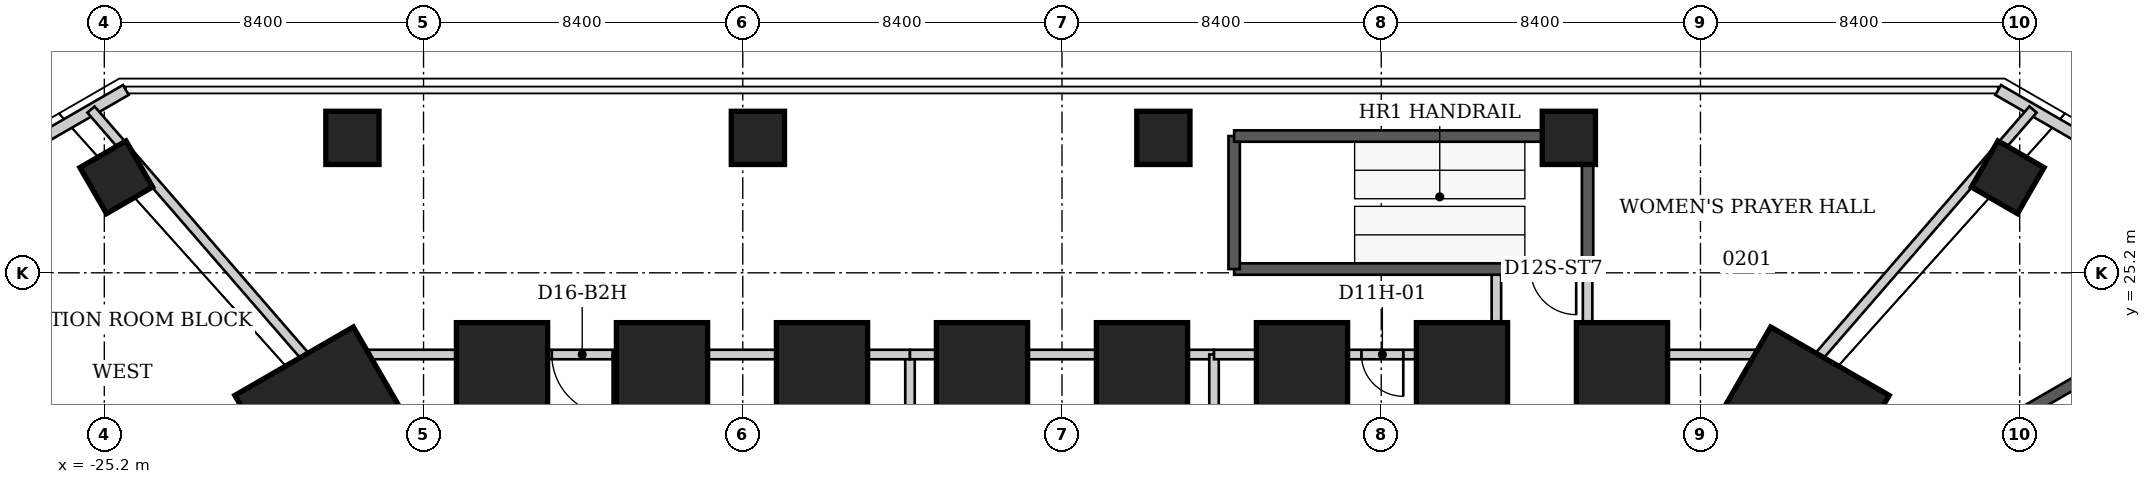
"""IFC4 building model, lengths in metres.
Left out: names, types, materials, properties, quantities, classifications, styles, units other than length and angle.
Written with IfcOpenShell. Run it as: python <this file> out.ifc"""

import sys

from ifc_helpers import new_model, si_unit, direction, frame, frame_2d, origin, origin_2d, place, context, subcontext, project, spatial, rectangle, extrude, element, fill, save


model = new_model("IFC4")
c1 = context("Model", 3, precision=1e-05, world=origin(), true_north=direction((0.0, 1.0)))
c2 = subcontext(c1, "Body", "Model", "MODEL_VIEW")
j1 = project(units=[si_unit("LENGTHUNIT", "METRE"), si_unit("PLANEANGLEUNIT", "RADIAN")], contexts=[c1])
p1 = place(None, origin())
s1 = spatial("IfcSite", under=j1, at=p1, CompositionType="ELEMENT")
p2 = place(p1, origin())
s2 = spatial("IfcBuilding", under=s1, at=p2, CompositionType="ELEMENT")
p3 = place(p2, frame((0.0, 0.0, 12.0)))
s3 = spatial("IfcBuildingStorey", under=s2, at=p3, CompositionType="ELEMENT", Elevation=12.0)
for number, where, z_axis, x_axis in (
    (1, (-14.735, 22.689, 0.0), (0.0, 0.0, 1.0), (0.0, 1.0, 0.0)),
    (2, (-10.525, 22.689, 0.0), (0.0, 0.0, 1.0), (0.0, 1.0, 0.0)),
    (3, (-6.315, 22.689, 0.0), (0.0, 0.0, 1.0), (0.0, 1.0, 0.0)),
    (4, (-2.105, 22.689, 0.0), (0.0, 0.0, 1.0), (0.0, 1.0, 0.0)),
    (5, (2.105, 22.689, 0.0), (0.0, 0.0, 1.0), (0.0, 1.0, 0.0)),
    (6, (6.315, 22.689, 0.0), (0.0, 0.0, 1.0), (0.0, 1.0, 0.0)),
    (7, (10.525, 22.689, 0.0), (0.0, 0.0, 1.0), (0.0, 1.0, 0.0)),
    (8, (14.735, 22.689, 0.0), (0.0, 0.0, 1.0), (0.0, 1.0, 0.0)),
):
    element("IfcColumn", number, at=place(p3, frame(where, z_axis=z_axis, x_axis=x_axis)), inside=s3, PredefinedType="COLUMN", context=c2, shape_type="SweptSolid", body=[
        extrude(rectangle(XDim=2.4, YDim=2.4, at=origin_2d()), origin(), (0.0, 0.0, 1.0), 6.0),
    ])
for number, where, z_axis, x_axis in (
    (9, (19.606, 21.835, 0.0), (0.0, 0.0, 1.0), (0.5, 0.866, 0.0)),
    (10, (-19.606, 21.835, 0.0), (0.0, 0.0, 1.0), (-0.5, 0.866, 0.0)),
):
    element("IfcColumn", number, at=place(p3, frame(where, z_axis=z_axis, x_axis=x_axis)), inside=s3, PredefinedType="COLUMN", context=c2, shape_type="SweptSolid", body=[
        extrude(rectangle(XDim=2.4, YDim=3.6, at=origin_2d()), origin(), (0.0, 0.0, 1.0), 6.0),
    ])
for number, where, z_axis, x_axis in (
    (11, (-18.672, 28.751, 0.0), (0.0, 0.0, 1.0), (0.0, 1.0, 0.0)),
    (12, (-8.002, 28.751, 0.0), (0.0, 0.0, 1.0), (0.0, 1.0, 0.0)),
    (13, (2.667, 28.751, 0.0), (0.0, 0.0, 1.0), (0.0, 1.0, 0.0)),
    (14, (13.337, 28.751, 0.0), (0.0, 0.0, 1.0), (0.0, 1.0, 0.0)),
    (15, (24.885, 27.714, 0.0), (0.0, 0.0, 1.0), (0.5, 0.866, 0.0)),
    (16, (-24.885, 27.714, 0.0), (0.0, 0.0, 1.0), (-0.5, 0.866, 0.0)),
):
    element("IfcColumn", number, at=place(p3, frame(where, z_axis=z_axis, x_axis=x_axis)), inside=s3, PredefinedType="COLUMN", context=c2, shape_type="SweptSolid", body=[
        extrude(rectangle(XDim=1.4, YDim=1.4, at=origin_2d()), origin(), (0.0, 0.0, 1.0), 6.0),
    ])
for number, where, z_axis, x_axis in (
    (17, (24.633, 30.011, 0.0), (0.0, 0.0, 1.0), (0.866, -0.5, 0.0)),
    (18, (-26.799, 28.761, 0.0), (0.0, 0.0, 1.0), (0.866, 0.5, 0.0)),
):
    element("IfcWall", number, at=place(p3, frame(where, z_axis=z_axis, x_axis=x_axis)), inside=s3, PredefinedType="SOLIDWALL", context=c2, shape_type="SweptSolid", body=[
        extrude(rectangle(XDim=2.5, YDim=0.3, at=frame_2d((1.25, 0.0))), origin(), (0.0, 0.0, 1.0), 5.6),
    ])
p4 = place(p3, frame((-20.88, 22.05, 0.0), z_axis=(0.0, 0.0, 1.0), x_axis=(-0.50097690648, -0.86546065143, 0.0)))
e19 = element("IfcWall", 19, at=p4, inside=s3, PredefinedType="PARTITIONING", context=c2, shape_type="SweptSolid", body=[
    extrude(rectangle(XDim=5.35, YDim=0.25, at=frame_2d((2.675, 0.0))), origin(), (0.0, 0.0, 1.0), 4.04),
])
p5 = place(p3, frame((-20.23, 22.43, 0.0), z_axis=(0.0, 0.0, 1.0), x_axis=(-0.863331575042, -0.504637088942, 0.0)))
e20 = element("IfcWall", 20, at=p5, inside=s3, PredefinedType="PARTITIONING", context=c2, shape_type="SweptSolid", body=[
    extrude(rectangle(XDim=0.753, YDim=0.25, at=frame_2d((0.376, 0.0))), origin(), (0.0, 0.0, 1.0), 5.84),
])
p6 = place(p3, frame((-19.746, 22.708, 0.0), z_axis=(0.0, 0.0, 1.0), x_axis=(-0.867257505244, -0.49785983931, 0.0)))
e21 = element("IfcWall", 21, at=p6, inside=s3, PredefinedType="PARTITIONING", context=c2, shape_type="SweptSolid", body=[
    extrude(rectangle(XDim=0.443, YDim=0.25, at=frame_2d((0.221, 0.0))), origin(), (0.0, 0.0, 1.0), 5.84),
])
p7 = place(p3, frame((-19.69, 22.74, 0.0), z_axis=(0.0, 0.0, 1.0), x_axis=(-0.655186130594, 0.755467493859, 0.0)))
e22 = element("IfcWall", 22, at=p7, inside=s3, PredefinedType="PARTITIONING", context=c2, shape_type="SweptSolid", body=[
    extrude(rectangle(XDim=8.945, YDim=0.25, at=frame_2d((4.472, 0.0))), origin(), (0.0, 0.0, 1.0), 5.6),
])
p8 = place(p3, frame((-19.15, 23.05, 0.0), z_axis=(0.0, 0.0, 1.0), x_axis=(-0.867193315, -0.497971640175, 0.0)))
e23 = element("IfcWall", 23, at=p8, inside=s3, PredefinedType="PARTITIONING", context=c2, shape_type="SweptSolid", body=[
    extrude(rectangle(XDim=0.588, YDim=0.25, at=frame_2d((0.294, 0.0))), origin(), (0.0, 0.0, 1.0), 5.84),
])
p9 = place(p3, frame((-17.14, 20.65, 0.0), z_axis=(0.0, 0.0, 1.0), x_axis=(-0.866514787199, 0.49915140345, 0.0)))
e24 = element("IfcWall", 24, at=p9, inside=s3, PredefinedType="PARTITIONING", context=c2, shape_type="SweptSolid", body=[
    extrude(rectangle(XDim=3.566, YDim=0.25, at=frame_2d((1.783, 0.0))), origin(), (0.0, 0.0, 1.0), 5.84),
])
p10 = place(p3, frame((-4.0, 10.04, 0.0), z_axis=(0.0, 0.0, 1.0), x_axis=(0.0, 1.0, 0.0)))
e25 = element("IfcWall", 25, at=p10, inside=s3, PredefinedType="PARTITIONING", context=c2, shape_type="SweptSolid", body=[
    extrude(rectangle(XDim=13.01, YDim=0.25, at=frame_2d((6.505, 0.0))), origin(), (0.0, 0.0, 1.0), 5.84),
])
p11 = place(p3, frame((-4.0, 23.05, 0.0), z_axis=(0.0, 0.0, 1.0), x_axis=(-1.0, 0.0, 0.0)))
e26 = element("IfcWall", 26, at=p11, inside=s3, PredefinedType="PARTITIONING", context=c2, shape_type="SweptSolid", body=[
    extrude(rectangle(XDim=15.15, YDim=0.25, at=frame_2d((7.575, 0.0))), origin(), (0.0, 0.0, 1.0), 4.04),
])
p12 = place(p11, frame((7.825, 0.0, 0.0)))
e27 = element("IfcOpeningElement", 27, at=p12, cuts=e26, PredefinedType="OPENING", context=c2, shape_type="SweptSolid", body=[
    extrude(rectangle(XDim=1.6, YDim=2.4, at=frame_2d((0.8, 1.2))), frame((0.0, 0.125, 0.0), z_axis=(0.0, -1.0, 0.0), x_axis=(1.0, 0.0, 0.0)), (0.0, 0.0, 1.0), 0.25),
])
p13 = place(p3, frame((4.0, 23.05, 0.0), z_axis=(0.0, 0.0, 1.0), x_axis=(-1.0, 0.0, 0.0)))
e28 = element("IfcWall", 28, at=p13, inside=s3, PredefinedType="PARTITIONING", context=c2, shape_type="SweptSolid", body=[
    extrude(rectangle(XDim=8.0, YDim=0.25, at=frame_2d((4.0, 0.0))), origin(), (0.0, 0.0, 1.0), 4.04),
])
p14 = place(p3, frame((4.0, 23.05, 0.0), z_axis=(0.0, 0.0, 1.0), x_axis=(0.0, -1.0, 0.0)))
e29 = element("IfcWall", 29, at=p14, inside=s3, PredefinedType="PARTITIONING", context=c2, shape_type="SweptSolid", body=[
    extrude(rectangle(XDim=13.03, YDim=0.25, at=frame_2d((6.515, 0.0))), origin(), (0.0, 0.0, 1.0), 5.84),
])
p15 = place(p3, frame((5.43, 23.05, 0.0), z_axis=(0.0, 0.0, 1.0), x_axis=(-1.0, 0.0, 0.0)))
e30 = element("IfcWall", 30, at=p15, inside=s3, PredefinedType="PARTITIONING", context=c2, shape_type="SweptSolid", body=[
    extrude(rectangle(XDim=1.43, YDim=0.25, at=frame_2d((0.715, 0.0))), origin(), (0.0, 0.0, 1.0), 4.04),
])
p16 = place(p3, frame((5.43, 23.05, 0.0), z_axis=(0.0, 0.0, 1.0), x_axis=(0.0, -1.0, 0.0)))
e31 = element("IfcWall", 31, at=p16, inside=s3, PredefinedType="PARTITIONING", context=c2, shape_type="SweptSolid", body=[
    extrude(rectangle(XDim=2.4, YDim=0.25, at=frame_2d((1.2, 0.0))), origin(), (0.0, 0.0, 1.0), 5.84),
])
p17 = place(p3, frame((11.43, 23.05, 0.0), z_axis=(0.0, 0.0, 1.0), x_axis=(-1.0, 0.0, 0.0)))
e32 = element("IfcWall", 32, at=p17, inside=s3, PredefinedType="PARTITIONING", context=c2, shape_type="SweptSolid", body=[
    extrude(rectangle(XDim=6.0, YDim=0.25, at=frame_2d((3.0, 0.0))), origin(), (0.0, 0.0, 1.0), 4.04),
])
p18 = place(p17, frame((2.45, 0.0, 0.0)))
e33 = element("IfcOpeningElement", 33, at=p18, cuts=e32, PredefinedType="OPENING", context=c2, shape_type="SweptSolid", body=[
    extrude(rectangle(XDim=1.1, YDim=2.2, at=frame_2d((0.55, 1.1))), frame((0.0, 0.125, 0.0), z_axis=(0.0, -1.0, 0.0), x_axis=(1.0, 0.0, 0.0)), (0.0, 0.0, 1.0), 0.25),
])
for number, where, z_axis, x_axis in (
    (34, (11.43, 25.2, 0.0), (0.0, 0.0, 1.0), (0.0, -1.0, 0.0)),
    (35, (13.83, 23.05, 0.0), (0.0, 0.0, 1.0), (0.0, 1.0, 0.0)),
):
    element("IfcWall", number, at=place(p3, frame(where, z_axis=z_axis, x_axis=x_axis)), inside=s3, PredefinedType="PARTITIONING", context=c2, shape_type="SweptSolid", body=[
        extrude(rectangle(XDim=2.15, YDim=0.25, at=frame_2d((1.075, 0.0))), origin(), (0.0, 0.0, 1.0), 5.6),
    ])
p19 = place(p3, frame((19.15, 23.05, 0.0), z_axis=(0.0, 0.0, 1.0), x_axis=(-1.0, 0.0, 0.0)))
e36 = element("IfcWall", 36, at=p19, inside=s3, PredefinedType="PARTITIONING", context=c2, shape_type="SweptSolid", body=[
    extrude(rectangle(XDim=5.32, YDim=0.25, at=frame_2d((2.66, 0.0))), origin(), (0.0, 0.0, 1.0), 4.04),
])
p20 = place(p3, frame((19.15, 23.05, 0.0), z_axis=(0.0, 0.0, 1.0), x_axis=(0.866627900645, -0.498954989777, 0.0)))
e37 = element("IfcWall", 37, at=p20, inside=s3, PredefinedType="PARTITIONING", context=c2, shape_type="SweptSolid", body=[
    extrude(rectangle(XDim=0.588, YDim=0.25, at=frame_2d((0.294, 0.0))), origin(), (0.0, 0.0, 1.0), 5.84),
])
p21 = place(p3, frame((19.733, 22.715, 0.0), z_axis=(0.0, 0.0, 1.0), x_axis=(0.866550582058, -0.499089259287, 0.0)))
e38 = element("IfcWall", 38, at=p21, inside=s3, PredefinedType="PARTITIONING", context=c2, shape_type="SweptSolid", body=[
    extrude(rectangle(XDim=0.089, YDim=0.25, at=frame_2d((0.044, 0.0))), origin(), (0.0, 0.0, 1.0), 5.84),
])
p22 = place(p3, frame((19.83, 19.08, 0.0), z_axis=(0.0, 0.0, 1.0), x_axis=(-0.005576247883, 0.999984452609, 0.0)))
e39 = element("IfcWall", 39, at=p22, inside=s3, PredefinedType="PARTITIONING", context=c2, shape_type="SweptSolid", body=[
    extrude(rectangle(XDim=3.59, YDim=0.25, at=frame_2d((1.795, 0.0))), origin(), (0.0, 0.0, 1.0), 5.84),
])
p23 = place(p3, frame((20.88, 22.05, 0.0), z_axis=(0.0, 0.0, 1.0), x_axis=(-0.865250488556, 0.501339796998, 0.0)))
e40 = element("IfcWall", 40, at=p23, inside=s3, PredefinedType="PARTITIONING", context=c2, shape_type="SweptSolid", body=[
    extrude(rectangle(XDim=1.236, YDim=0.25, at=frame_2d((0.618, 0.0))), origin(), (0.0, 0.0, 1.0), 5.84),
])
p24 = place(p3, frame((22.67, 18.96, 0.0), z_axis=(0.0, 0.0, 1.0), x_axis=(-0.501254541389, 0.865299881392, 0.0)))
e41 = element("IfcWall", 41, at=p24, inside=s3, PredefinedType="PARTITIONING", context=c2, shape_type="SweptSolid", body=[
    extrude(rectangle(XDim=3.571, YDim=0.25, at=frame_2d((1.786, 0.0))), origin(), (0.0, 0.0, 1.0), 5.84),
])
p25 = place(p3, frame((25.55, 29.497, 0.0), z_axis=(0.0, 0.0, 1.0), x_axis=(-0.655186130594, -0.755467493859, 0.0)))
e42 = element("IfcWall", 42, at=p25, inside=s3, PredefinedType="PARTITIONING", context=c2, shape_type="SweptSolid", body=[
    extrude(rectangle(XDim=8.945, YDim=0.25, at=frame_2d((4.472, 0.0))), origin(), (0.0, 0.0, 1.0), 5.6),
])
p26 = place(p3, frame((24.165, 20.867, 0.0), z_axis=(0.0, 0.0, 1.0), x_axis=(0.866016039709, 0.500016218704, 0.0)))
e43 = element("IfcWall", 43, at=p26, inside=s3, PredefinedType="SHEAR", context=c2, shape_type="SweptSolid", body=[
    extrude(rectangle(XDim=4.7, YDim=0.3, at=frame_2d((2.35, 0.0))), origin(), (0.0, 0.0, 1.0), 6.0),
])
p27 = place(p3, frame((13.83, 25.299, 0.0), z_axis=(0.0, 0.0, 1.0), x_axis=(-1.0, 0.0, 0.0)))
e44 = element("IfcWall", 44, at=p27, inside=s3, PredefinedType="SHEAR", context=c2, shape_type="SweptSolid", body=[
    extrude(rectangle(XDim=9.3, YDim=0.3, at=frame_2d((4.65, 0.0))), origin(), (0.0, 0.0, 1.0), 6.0),
])
p28 = place(p27, frame((0.3, 0.0, 0.0)))
e45 = element("IfcOpeningElement", 45, at=p28, cuts=e44, PredefinedType="OPENING", context=c2, shape_type="SweptSolid", body=[
    extrude(rectangle(XDim=1.2, YDim=2.4, at=frame_2d((0.6, 1.2))), frame((0.0, 0.15, 0.0), z_axis=(0.0, -1.0, 0.0), x_axis=(1.0, 0.0, 0.0)), (0.0, 0.0, 1.0), 0.3),
])
p29 = place(p3, frame((4.53, 25.299, 0.0), z_axis=(0.0, 0.0, 1.0), x_axis=(0.0, 1.0, 0.0)))
e46 = element("IfcWall", 46, at=p29, inside=s3, PredefinedType="SHEAR", context=c2, shape_type="SweptSolid", body=[
    extrude(rectangle(XDim=3.5, YDim=0.3, at=frame_2d((1.75, 0.0))), origin(), (0.0, 0.0, 1.0), 6.0),
])
p30 = place(p3, frame((4.53, 28.799, 0.0), z_axis=(0.0, 0.0, 1.0), x_axis=(1.0, 0.0, 0.0)))
e47 = element("IfcWall", 47, at=p30, inside=s3, PredefinedType="SHEAR", context=c2, shape_type="SweptSolid", body=[
    extrude(rectangle(XDim=9.3, YDim=0.3, at=frame_2d((4.65, 0.0))), origin(), (0.0, 0.0, 1.0), 6.0),
])
p31 = place(p3, frame((13.83, 28.799, 0.0), z_axis=(0.0, 0.0, 1.0), x_axis=(0.0, -1.0, 0.0)))
e48 = element("IfcWall", 48, at=p31, inside=s3, PredefinedType="SHEAR", context=c2, shape_type="SweptSolid", body=[
    extrude(rectangle(XDim=3.5, YDim=0.3, at=frame_2d((1.75, 0.0))), origin(), (0.0, 0.0, 1.0), 6.0),
])
p32 = place(p18, origin())
e49 = element("IfcDoor", 49, at=p32, inside=s3, OperationType="SINGLE_SWING_LEFT", PredefinedType="DOOR", context=c2, shape_type="SweptSolid", body=[
    extrude(rectangle(XDim=1.1, YDim=2.2, at=frame_2d((0.55, 1.1))), frame((0.0, 0.025, 0.0), z_axis=(0.0, -1.0, 0.0), x_axis=(1.0, 0.0, 0.0)), (0.0, 0.0, 1.0), 0.05),
])
fill(e33, e49)
p33 = place(p12, origin())
e50 = element("IfcDoor", 50, at=p33, inside=s3, OperationType="DOUBLE_DOOR_SINGLE_SWING", PredefinedType="DOOR", context=c2, shape_type="SweptSolid", body=[
    extrude(rectangle(XDim=1.6, YDim=2.4, at=frame_2d((0.8, 1.2))), frame((0.0, 0.025, 0.0), z_axis=(0.0, -1.0, 0.0), x_axis=(1.0, 0.0, 0.0)), (0.0, 0.0, 1.0), 0.05),
])
fill(e27, e50)
p34 = place(p28, origin())
e51 = element("IfcDoor", 51, at=p34, inside=s3, OperationType="SINGLE_SWING_LEFT", PredefinedType="DOOR", context=c2, shape_type="SweptSolid", body=[
    extrude(rectangle(XDim=1.2, YDim=2.4, at=frame_2d((0.6, 1.2))), frame((0.0, 0.025, 0.0), z_axis=(0.0, -1.0, 0.0), x_axis=(1.0, 0.0, 0.0)), (0.0, 0.0, 1.0), 0.05),
])
fill(e45, e51)
save(model, sys.argv[1])
